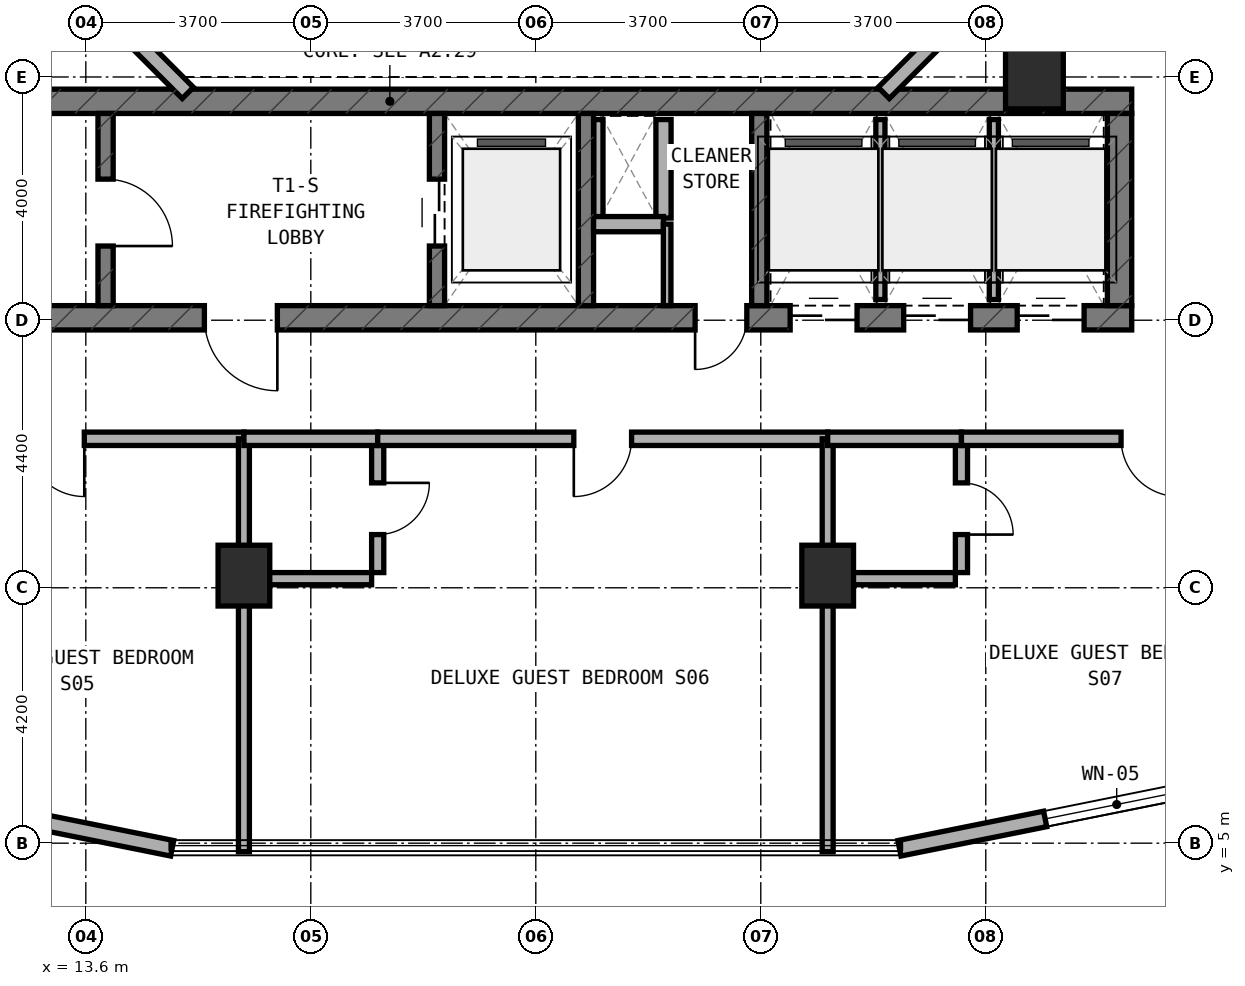
"""IFC4 building model, lengths in metres.
Left out: names, types, materials, properties, quantities, classifications, styles, units other than length and angle.
Written with IfcOpenShell. Run it as: python <this file> out.ifc"""

import sys

from ifc_helpers import new_model, si_unit, direction, frame, frame_2d, origin, origin_2d, place, context, subcontext, project, spatial, rectangle, extrude, element, fill, save


model = new_model("IFC4")
c1 = context("Model", 3, precision=1e-05, world=origin(), true_north=direction((0.0, 1.0)))
c2 = subcontext(c1, "Body", "Model", "MODEL_VIEW")
j1 = project(units=[si_unit("LENGTHUNIT", "METRE"), si_unit("PLANEANGLEUNIT", "RADIAN")], contexts=[c1])
p1 = place(None, origin())
s1 = spatial("IfcSite", under=j1, at=p1, CompositionType="ELEMENT")
p2 = place(p1, origin())
s2 = spatial("IfcBuilding", under=s1, at=p2, CompositionType="ELEMENT")
p3 = place(p2, frame((0.0, 0.0, 127.5)))
s3 = spatial("IfcBuildingStorey", under=s2, at=p3, CompositionType="ELEMENT", Elevation=127.5)
p4 = place(p3, frame((6.4, 13.64, 0.0), z_axis=(0.0, 0.0, 1.0), x_axis=(1.0, 0.0, 0.0)))
e1 = element("IfcWall", 1, at=p4, inside=s3, PredefinedType="SHEAR", context=c2, shape_type="SweptSolid", body=[
    extrude(rectangle(XDim=24.4, YDim=0.4, at=frame_2d((12.2, 0.0))), origin(), (0.0, 0.0, 1.0), 3.5),
])
p5 = place(p4, frame((9.15, 0.0, 0.0)))
e2 = element("IfcOpeningElement", 2, at=p5, cuts=e1, PredefinedType="OPENING", context=c2, shape_type="SweptSolid", body=[
    extrude(rectangle(XDim=1.2, YDim=2.15, at=frame_2d((0.6, 1.075))), frame((0.0, 0.21, 0.0), z_axis=(0.0, -1.0, 0.0), x_axis=(1.0, 0.0, 0.0)), (0.0, 0.0, 1.0), 0.42),
])
p6 = place(p4, frame((17.22, 0.0, 0.0)))
e3 = element("IfcOpeningElement", 3, at=p6, cuts=e1, PredefinedType="OPENING", context=c2, shape_type="SweptSolid", body=[
    extrude(rectangle(XDim=0.85, YDim=2.1, at=frame_2d((0.425, 1.05))), frame((0.0, 0.21, 0.0), z_axis=(0.0, -1.0, 0.0), x_axis=(1.0, 0.0, 0.0)), (0.0, 0.0, 1.0), 0.42),
])
p7 = place(p4, frame((18.783, 0.0, 0.0)))
e4 = element("IfcOpeningElement", 4, at=p7, cuts=e1, PredefinedType="OPENING", context=c2, shape_type="SweptSolid", body=[
    extrude(rectangle(XDim=1.1, YDim=2.15, at=frame_2d((0.55, 1.075))), frame((0.0, 0.21, 0.0), z_axis=(0.0, -1.0, 0.0), x_axis=(1.0, 0.0, 0.0)), (0.0, 0.0, 1.0), 0.42),
])
p8 = place(p4, frame((20.65, 0.0, 0.0)))
e5 = element("IfcOpeningElement", 5, at=p8, cuts=e1, PredefinedType="OPENING", context=c2, shape_type="SweptSolid", body=[
    extrude(rectangle(XDim=1.1, YDim=2.15, at=frame_2d((0.55, 1.075))), frame((0.0, 0.21, 0.0), z_axis=(0.0, -1.0, 0.0), x_axis=(1.0, 0.0, 0.0)), (0.0, 0.0, 1.0), 0.42),
])
p9 = place(p4, frame((22.517, 0.0, 0.0)))
e6 = element("IfcOpeningElement", 6, at=p9, cuts=e1, PredefinedType="OPENING", context=c2, shape_type="SweptSolid", body=[
    extrude(rectangle(XDim=1.1, YDim=2.15, at=frame_2d((0.55, 1.075))), frame((0.0, 0.21, 0.0), z_axis=(0.0, -1.0, 0.0), x_axis=(1.0, 0.0, 0.0)), (0.0, 0.0, 1.0), 0.42),
])
p10 = place(p3, frame((6.4, 17.2, 0.0), z_axis=(0.0, 0.0, 1.0), x_axis=(1.0, 0.0, 0.0)))
e7 = element("IfcWall", 7, at=p10, inside=s3, PredefinedType="SHEAR", context=c2, shape_type="SweptSolid", body=[
    extrude(rectangle(XDim=24.4, YDim=0.4, at=frame_2d((12.2, 0.0))), origin(), (0.0, 0.0, 1.0), 3.5),
])
p11 = place(p3, frame((30.6, 13.84, 0.0), z_axis=(0.0, 0.0, 1.0), x_axis=(0.0, 1.0, 0.0)))
e8 = element("IfcWall", 8, at=p11, inside=s3, PredefinedType="SHEAR", context=c2, shape_type="SweptSolid", body=[
    extrude(rectangle(XDim=3.16, YDim=0.4, at=frame_2d((1.58, 0.0))), origin(), (0.0, 0.0, 1.0), 3.5),
])
p12 = place(p3, frame((13.925, 13.84, 0.0), z_axis=(0.0, 0.0, 1.0), x_axis=(0.0, 1.0, 0.0)))
e9 = element("IfcWall", 9, at=p12, inside=s3, PredefinedType="STANDARD", context=c2, shape_type="SweptSolid", body=[
    extrude(rectangle(XDim=3.16, YDim=0.25, at=frame_2d((1.58, 0.0))), origin(), (0.0, 0.0, 1.0), 3.22),
])
p13 = place(p12, frame((0.98, 0.0, 0.0)))
e10 = element("IfcOpeningElement", 10, at=p13, cuts=e9, PredefinedType="OPENING", context=c2, shape_type="SweptSolid", body=[
    extrude(rectangle(XDim=1.1, YDim=2.15, at=frame_2d((0.55, 1.075))), frame((0.0, 0.135, 0.0), z_axis=(0.0, -1.0, 0.0), x_axis=(1.0, 0.0, 0.0)), (0.0, 0.0, 1.0), 0.27),
])
p14 = place(p3, frame((19.375, 13.84, 0.0), z_axis=(0.0, 0.0, 1.0), x_axis=(0.0, 1.0, 0.0)))
e11 = element("IfcWall", 11, at=p14, inside=s3, PredefinedType="STANDARD", context=c2, shape_type="SweptSolid", body=[
    extrude(rectangle(XDim=3.16, YDim=0.25, at=frame_2d((1.58, 0.0))), origin(), (0.0, 0.0, 1.0), 3.22),
])
p15 = place(p14, frame((0.98, 0.0, 0.0)))
e12 = element("IfcOpeningElement", 12, at=p15, cuts=e11, PredefinedType="OPENING", context=c2, shape_type="SweptSolid", body=[
    extrude(rectangle(XDim=1.1, YDim=2.15, at=frame_2d((0.55, 1.075))), frame((0.0, 0.135, 0.0), z_axis=(0.0, -1.0, 0.0), x_axis=(1.0, 0.0, 0.0)), (0.0, 0.0, 1.0), 0.27),
])
for number, where, z_axis, x_axis in (
    (13, (21.825, 13.84, 0.0), (0.0, 0.0, 1.0), (0.0, 1.0, 0.0)),
    (14, (24.675, 13.84, 0.0), (0.0, 0.0, 1.0), (0.0, 1.0, 0.0)),
):
    element("IfcWall", number, at=place(p3, frame(where, z_axis=z_axis, x_axis=x_axis)), inside=s3, PredefinedType="STANDARD", context=c2, shape_type="SweptSolid", body=[
        extrude(rectangle(XDim=3.16, YDim=0.25, at=frame_2d((1.58, 0.0))), origin(), (0.0, 0.0, 1.0), 3.22),
    ])
for number, where, z_axis, x_axis in (
    (15, (16.2, 9.4, 0.0), (0.0, 0.0, 1.0), (1.0, 0.0, 0.0)),
    (16, (25.8, 9.4, 0.0), (0.0, 0.0, 1.0), (1.0, 0.0, 0.0)),
):
    element("IfcColumn", number, at=place(p3, frame(where, z_axis=z_axis, x_axis=x_axis)), inside=s3, PredefinedType="COLUMN", context=c2, shape_type="SweptSolid", body=[
        extrude(rectangle(XDim=0.85, YDim=1.0, at=origin_2d()), origin(), (0.0, 0.0, 1.0), 3.5),
    ])
p16 = place(p3, frame((29.2, 17.65, 0.0), z_axis=(0.0, 0.0, 1.0), x_axis=(1.0, 0.0, 0.0)))
e17 = element("IfcColumn", 17, at=p16, inside=s3, PredefinedType="COLUMN", context=c2, shape_type="SweptSolid", body=[
    extrude(rectangle(XDim=0.95, YDim=1.15, at=origin_2d()), origin(), (0.0, 0.0, 1.0), 3.5),
])
p17 = place(p3, frame((6.018, 6.729, 0.0), z_axis=(0.0, 0.0, 1.0), x_axis=(0.980315963543, -0.197435082048, 0.0)))
e18 = element("IfcWall", 18, at=p17, inside=s3, PredefinedType="STANDARD", context=c2, shape_type="SweptSolid", body=[
    extrude(rectangle(XDim=9.183, YDim=0.26, at=frame_2d((4.591, 0.0))), origin(), (0.0, 0.0, 1.0), 3.22),
])
p18 = place(p17, frame((4.337, 0.0, 0.8)))
e19 = element("IfcOpeningElement", 19, at=p18, cuts=e18, PredefinedType="OPENING", context=c2, shape_type="SweptSolid", body=[
    extrude(rectangle(XDim=2.4, YDim=1.6, at=frame_2d((1.2, 0.8))), frame((0.0, 0.14, 0.0), z_axis=(0.0, -1.0, 0.0), x_axis=(1.0, 0.0, 0.0)), (0.0, 0.0, 1.0), 0.28),
])
p19 = place(p3, frame((26.98, 4.916, 0.0), z_axis=(0.0, 0.0, 1.0), x_axis=(0.980315963543, 0.197435082048, 0.0)))
e20 = element("IfcWall", 20, at=p19, inside=s3, PredefinedType="STANDARD", context=c2, shape_type="SweptSolid", body=[
    extrude(rectangle(XDim=9.183, YDim=0.26, at=frame_2d((4.591, 0.0))), origin(), (0.0, 0.0, 1.0), 3.22),
])
p20 = place(p19, frame((2.445, 0.0, 0.8)))
e21 = element("IfcOpeningElement", 21, at=p20, cuts=e20, PredefinedType="OPENING", context=c2, shape_type="SweptSolid", body=[
    extrude(rectangle(XDim=2.4, YDim=1.6, at=frame_2d((1.2, 0.8))), frame((0.0, 0.14, 0.0), z_axis=(0.0, -1.0, 0.0), x_axis=(1.0, 0.0, 0.0)), (0.0, 0.0, 1.0), 0.28),
])
for number, where, z_axis, x_axis in (
    (22, (26.722, 17.338, 0.0), (0.0, 0.0, 1.0), (0.707, 0.707, 0.0)),
    (23, (13.444, 19.172, 0.0), (0.0, 0.0, 1.0), (0.707, -0.707, 0.0)),
):
    element("IfcWall", number, at=place(p3, frame(where, z_axis=z_axis, x_axis=x_axis)), inside=s3, PredefinedType="STANDARD", context=c2, shape_type="SweptSolid", body=[
        extrude(rectangle(XDim=2.594, YDim=0.26, at=frame_2d((1.297, 0.0))), origin(), (0.0, 0.0, 1.0), 3.22),
    ])
p21 = place(p3, frame((22.03, 15.28, 0.0), z_axis=(0.0, 0.0, 1.0), x_axis=(0.0, 1.0, 0.0)))
e24 = element("IfcWall", 24, at=p21, inside=s3, PredefinedType="PARTITIONING", context=c2, shape_type="SweptSolid", body=[
    extrude(rectangle(XDim=1.62, YDim=0.15, at=frame_2d((0.81, 0.0))), origin(), (0.0, 0.0, 1.0), 3.22),
])
p22 = place(p3, frame((23.1, 15.28, 0.0), z_axis=(0.0, 0.0, 1.0), x_axis=(0.0, 1.0, 0.0)))
e25 = element("IfcWall", 25, at=p22, inside=s3, PredefinedType="SOLIDWALL", context=c2, shape_type="SweptSolid", body=[
    extrude(rectangle(XDim=1.62, YDim=0.25, at=frame_2d((0.81, 0.0))), origin(), (0.0, 0.0, 1.0), 3.22),
])
p23 = place(p3, frame((21.95, 15.18, 0.0), z_axis=(0.0, 0.0, 1.0), x_axis=(1.0, 0.0, 0.0)))
e26 = element("IfcWall", 26, at=p23, inside=s3, PredefinedType="SOLIDWALL", context=c2, shape_type="SweptSolid", body=[
    extrude(rectangle(XDim=1.15, YDim=0.25, at=frame_2d((0.575, 0.0))), origin(), (0.0, 0.0, 1.0), 3.22),
])
p24 = place(p3, frame((23.16, 13.84, 0.0), z_axis=(0.0, 0.0, 1.0), x_axis=(0.0, 1.0, 0.0)))
e27 = element("IfcWall", 27, at=p24, inside=s3, PredefinedType="PARTITIONING", context=c2, shape_type="SweptSolid", body=[
    extrude(rectangle(XDim=1.34, YDim=0.125, at=frame_2d((0.67, 0.0))), origin(), (0.0, 0.0, 1.0), 3.22),
])
p25 = place(p3, frame((26.667, 13.94, 0.0), z_axis=(0.0, 0.0, 1.0), x_axis=(0.0, 1.0, 0.0)))
e28 = element("IfcWall", 28, at=p25, inside=s3, PredefinedType="PARTITIONING", context=c2, shape_type="SweptSolid", body=[
    extrude(rectangle(XDim=2.96, YDim=0.15, at=frame_2d((1.48, 0.0))), origin(), (0.0, 0.0, 1.0), 3.22),
])
p26 = place(p3, frame((28.533, 13.94, 0.0), z_axis=(0.0, 0.0, 1.0), x_axis=(0.0, 1.0, 0.0)))
e29 = element("IfcWall", 29, at=p26, inside=s3, PredefinedType="PARTITIONING", context=c2, shape_type="SweptSolid", body=[
    extrude(rectangle(XDim=2.96, YDim=0.15, at=frame_2d((1.48, 0.0))), origin(), (0.0, 0.0, 1.0), 2.695),
])
p27 = place(p3, frame((10.0, 11.65, 0.0), z_axis=(0.0, 0.0, 1.0), x_axis=(1.0, 0.0, 0.0)))
e30 = element("IfcWall", 30, at=p27, inside=s3, PredefinedType="SOLIDWALL", context=c2, shape_type="SweptSolid", body=[
    extrude(rectangle(XDim=6.2, YDim=0.22, at=frame_2d((3.1, 0.0))), origin(), (0.0, 0.0, 1.0), 2.695),
])
p28 = place(p27, frame((2.625, 0.0, 0.0)))
e31 = element("IfcOpeningElement", 31, at=p28, cuts=e30, PredefinedType="OPENING", context=c2, shape_type="SweptSolid", body=[
    extrude(rectangle(XDim=0.95, YDim=2.1, at=frame_2d((0.475, 1.05))), frame((0.0, 0.12, 0.0), z_axis=(0.0, -1.0, 0.0), x_axis=(1.0, 0.0, 0.0)), (0.0, 0.0, 1.0), 0.24),
])
p29 = place(p3, frame((16.2, 4.86, 0.0), z_axis=(0.0, 0.0, 1.0), x_axis=(0.0, 1.0, 0.0)))
e32 = element("IfcWall", 32, at=p29, inside=s3, PredefinedType="SOLIDWALL", context=c2, shape_type="SweptSolid", body=[
    extrude(rectangle(XDim=6.79, YDim=0.18, at=frame_2d((3.395, 0.0))), origin(), (0.0, 0.0, 1.0), 2.695),
])
p30 = place(p3, frame((18.4, 9.45, 0.0), z_axis=(0.0, 0.0, 1.0), x_axis=(0.0, 1.0, 0.0)))
e33 = element("IfcWall", 33, at=p30, inside=s3, PredefinedType="PLUMBINGWALL", context=c2, shape_type="SweptSolid", body=[
    extrude(rectangle(XDim=2.1, YDim=0.2, at=frame_2d((1.05, 0.0))), origin(), (0.0, 0.0, 1.0), 2.745),
])
p31 = place(p30, frame((0.625, 0.0, 0.0)))
e34 = element("IfcOpeningElement", 34, at=p31, cuts=e33, PredefinedType="OPENING", context=c2, shape_type="SweptSolid", body=[
    extrude(rectangle(XDim=0.85, YDim=2.1, at=frame_2d((0.425, 1.05))), frame((0.0, 0.11, 0.0), z_axis=(0.0, -1.0, 0.0), x_axis=(1.0, 0.0, 0.0)), (0.0, 0.0, 1.0), 0.22),
])
p32 = place(p3, frame((16.3, 9.35, 0.0), z_axis=(0.0, 0.0, 1.0), x_axis=(1.0, 0.0, 0.0)))
e35 = element("IfcWall", 35, at=p32, inside=s3, PredefinedType="PLUMBINGWALL", context=c2, shape_type="SweptSolid", body=[
    extrude(rectangle(XDim=2.0, YDim=0.2, at=frame_2d((1.0, 0.0))), origin(), (0.0, 0.0, 1.0), 2.835),
])
p33 = place(p3, frame((16.2, 11.65, 0.0), z_axis=(0.0, 0.0, 1.0), x_axis=(1.0, 0.0, 0.0)))
e36 = element("IfcWall", 36, at=p33, inside=s3, PredefinedType="SOLIDWALL", context=c2, shape_type="SweptSolid", body=[
    extrude(rectangle(XDim=2.2, YDim=0.22, at=frame_2d((1.1, 0.0))), origin(), (0.0, 0.0, 1.0), 2.695),
])
p34 = place(p3, frame((18.4, 11.65, 0.0), z_axis=(0.0, 0.0, 1.0), x_axis=(1.0, 0.0, 0.0)))
e37 = element("IfcWall", 37, at=p34, inside=s3, PredefinedType="SOLIDWALL", context=c2, shape_type="SweptSolid", body=[
    extrude(rectangle(XDim=7.4, YDim=0.22, at=frame_2d((3.7, 0.0))), origin(), (0.0, 0.0, 1.0), 2.695),
])
p35 = place(p34, frame((3.225, 0.0, 0.0)))
e38 = element("IfcOpeningElement", 38, at=p35, cuts=e37, PredefinedType="OPENING", context=c2, shape_type="SweptSolid", body=[
    extrude(rectangle(XDim=0.95, YDim=2.1, at=frame_2d((0.475, 1.05))), frame((0.0, 0.12, 0.0), z_axis=(0.0, -1.0, 0.0), x_axis=(1.0, 0.0, 0.0)), (0.0, 0.0, 1.0), 0.24),
])
p36 = place(p3, frame((25.8, 4.86, 0.0), z_axis=(0.0, 0.0, 1.0), x_axis=(0.0, 1.0, 0.0)))
e39 = element("IfcWall", 39, at=p36, inside=s3, PredefinedType="SOLIDWALL", context=c2, shape_type="SweptSolid", body=[
    extrude(rectangle(XDim=6.79, YDim=0.18, at=frame_2d((3.395, 0.0))), origin(), (0.0, 0.0, 1.0), 2.695),
])
p37 = place(p3, frame((28.0, 9.45, 0.0), z_axis=(0.0, 0.0, 1.0), x_axis=(0.0, 1.0, 0.0)))
e40 = element("IfcWall", 40, at=p37, inside=s3, PredefinedType="PLUMBINGWALL", context=c2, shape_type="SweptSolid", body=[
    extrude(rectangle(XDim=2.1, YDim=0.2, at=frame_2d((1.05, 0.0))), origin(), (0.0, 0.0, 1.0), 2.745),
])
p38 = place(p37, frame((0.625, 0.0, 0.0)))
e41 = element("IfcOpeningElement", 41, at=p38, cuts=e40, PredefinedType="OPENING", context=c2, shape_type="SweptSolid", body=[
    extrude(rectangle(XDim=0.85, YDim=2.1, at=frame_2d((0.425, 1.05))), frame((0.0, 0.11, 0.0), z_axis=(0.0, -1.0, 0.0), x_axis=(1.0, 0.0, 0.0)), (0.0, 0.0, 1.0), 0.22),
])
p39 = place(p3, frame((25.9, 9.35, 0.0), z_axis=(0.0, 0.0, 1.0), x_axis=(1.0, 0.0, 0.0)))
e42 = element("IfcWall", 42, at=p39, inside=s3, PredefinedType="PLUMBINGWALL", context=c2, shape_type="SweptSolid", body=[
    extrude(rectangle(XDim=2.0, YDim=0.2, at=frame_2d((1.0, 0.0))), origin(), (0.0, 0.0, 1.0), 2.835),
])
p40 = place(p3, frame((25.8, 11.65, 0.0), z_axis=(0.0, 0.0, 1.0), x_axis=(1.0, 0.0, 0.0)))
e43 = element("IfcWall", 43, at=p40, inside=s3, PredefinedType="SOLIDWALL", context=c2, shape_type="SweptSolid", body=[
    extrude(rectangle(XDim=2.2, YDim=0.22, at=frame_2d((1.1, 0.0))), origin(), (0.0, 0.0, 1.0), 2.695),
])
p41 = place(p3, frame((28.0, 11.65, 0.0), z_axis=(0.0, 0.0, 1.0), x_axis=(1.0, 0.0, 0.0)))
e44 = element("IfcWall", 44, at=p41, inside=s3, PredefinedType="SOLIDWALL", context=c2, shape_type="SweptSolid", body=[
    extrude(rectangle(XDim=6.2, YDim=0.22, at=frame_2d((3.1, 0.0))), origin(), (0.0, 0.0, 1.0), 2.695),
])
p42 = place(p41, frame((2.625, 0.0, 0.0)))
e45 = element("IfcOpeningElement", 45, at=p42, cuts=e44, PredefinedType="OPENING", context=c2, shape_type="SweptSolid", body=[
    extrude(rectangle(XDim=0.95, YDim=2.1, at=frame_2d((0.475, 1.05))), frame((0.0, 0.12, 0.0), z_axis=(0.0, -1.0, 0.0), x_axis=(1.0, 0.0, 0.0)), (0.0, 0.0, 1.0), 0.24),
])
p43 = place(p20, origin())
e46 = element("IfcWindow", 46, at=p43, inside=s3, PartitioningType="SINGLE_PANEL", PredefinedType="WINDOW", context=c2, shape_type="SweptSolid", body=[
    extrude(rectangle(XDim=2.4, YDim=1.6, at=frame_2d((1.2, 0.8))), frame((0.0, 0.03, 0.0), z_axis=(0.0, -1.0, 0.0), x_axis=(1.0, 0.0, 0.0)), (0.0, 0.0, 1.0), 0.06),
])
fill(e21, e46)
p44 = place(p13, frame((1.1, 0.0, 0.0), z_axis=(0.0, 0.0, 1.0), x_axis=(-1.0, 0.0, 0.0)))
e47 = element("IfcDoor", 47, at=p44, inside=s3, OperationType="SINGLE_SWING_RIGHT", PredefinedType="DOOR", context=c2, shape_type="SweptSolid", body=[
    extrude(rectangle(XDim=1.1, YDim=2.15, at=frame_2d((0.55, 1.075))), frame((0.0, 0.025, 0.0), z_axis=(0.0, -1.0, 0.0), x_axis=(1.0, 0.0, 0.0)), (0.0, 0.0, 1.0), 0.05),
])
fill(e10, e47)
p45 = place(p5, frame((1.2, 0.0, 0.0), z_axis=(0.0, 0.0, 1.0), x_axis=(-1.0, 0.0, 0.0)))
e48 = element("IfcDoor", 48, at=p45, inside=s3, OperationType="SINGLE_SWING_LEFT", PredefinedType="DOOR", context=c2, shape_type="SweptSolid", body=[
    extrude(rectangle(XDim=1.2, YDim=2.15, at=frame_2d((0.6, 1.075))), frame((0.0, 0.025, 0.0), z_axis=(0.0, -1.0, 0.0), x_axis=(1.0, 0.0, 0.0)), (0.0, 0.0, 1.0), 0.05),
])
fill(e2, e48)
p46 = place(p15, origin())
e49 = element("IfcDoor", 49, at=p46, inside=s3, OperationType="DOUBLE_DOOR_SLIDING", PredefinedType="DOOR", context=c2, shape_type="SweptSolid", body=[
    extrude(rectangle(XDim=1.1, YDim=2.15, at=frame_2d((0.55, 1.075))), frame((0.0, 0.025, 0.0), z_axis=(0.0, -1.0, 0.0), x_axis=(1.0, 0.0, 0.0)), (0.0, 0.0, 1.0), 0.05),
])
fill(e12, e49)
p47 = place(p6, frame((0.85, 0.0, 0.0), z_axis=(0.0, 0.0, 1.0), x_axis=(-1.0, 0.0, 0.0)))
e50 = element("IfcDoor", 50, at=p47, inside=s3, OperationType="SINGLE_SWING_RIGHT", PredefinedType="DOOR", context=c2, shape_type="SweptSolid", body=[
    extrude(rectangle(XDim=0.85, YDim=2.1, at=frame_2d((0.425, 1.05))), frame((0.0, 0.025, 0.0), z_axis=(0.0, -1.0, 0.0), x_axis=(1.0, 0.0, 0.0)), (0.0, 0.0, 1.0), 0.05),
])
fill(e3, e50)
p48 = place(p7, frame((1.1, 0.0, 0.0), z_axis=(0.0, 0.0, 1.0), x_axis=(-1.0, 0.0, 0.0)))
e51 = element("IfcDoor", 51, at=p48, inside=s3, OperationType="DOUBLE_DOOR_SLIDING", PredefinedType="DOOR", context=c2, shape_type="SweptSolid", body=[
    extrude(rectangle(XDim=1.1, YDim=2.15, at=frame_2d((0.55, 1.075))), frame((0.0, 0.025, 0.0), z_axis=(0.0, -1.0, 0.0), x_axis=(1.0, 0.0, 0.0)), (0.0, 0.0, 1.0), 0.05),
])
fill(e4, e51)
p49 = place(p8, frame((1.1, 0.0, 0.0), z_axis=(0.0, 0.0, 1.0), x_axis=(-1.0, 0.0, 0.0)))
e52 = element("IfcDoor", 52, at=p49, inside=s3, OperationType="DOUBLE_DOOR_SLIDING", PredefinedType="DOOR", context=c2, shape_type="SweptSolid", body=[
    extrude(rectangle(XDim=1.1, YDim=2.15, at=frame_2d((0.55, 1.075))), frame((0.0, 0.025, 0.0), z_axis=(0.0, -1.0, 0.0), x_axis=(1.0, 0.0, 0.0)), (0.0, 0.0, 1.0), 0.05),
])
fill(e5, e52)
p50 = place(p9, frame((1.1, 0.0, 0.0), z_axis=(0.0, 0.0, 1.0), x_axis=(-1.0, 0.0, 0.0)))
e53 = element("IfcDoor", 53, at=p50, inside=s3, OperationType="DOUBLE_DOOR_SLIDING", PredefinedType="DOOR", context=c2, shape_type="SweptSolid", body=[
    extrude(rectangle(XDim=1.1, YDim=2.15, at=frame_2d((0.55, 1.075))), frame((0.0, 0.025, 0.0), z_axis=(0.0, -1.0, 0.0), x_axis=(1.0, 0.0, 0.0)), (0.0, 0.0, 1.0), 0.05),
])
fill(e6, e53)
p51 = place(p28, frame((0.95, 0.0, 0.0), z_axis=(0.0, 0.0, 1.0), x_axis=(-1.0, 0.0, 0.0)))
e54 = element("IfcDoor", 54, at=p51, inside=s3, OperationType="SINGLE_SWING_LEFT", PredefinedType="DOOR", context=c2, shape_type="SweptSolid", body=[
    extrude(rectangle(XDim=0.95, YDim=2.1, at=frame_2d((0.475, 1.05))), frame((0.0, 0.025, 0.0), z_axis=(0.0, -1.0, 0.0), x_axis=(1.0, 0.0, 0.0)), (0.0, 0.0, 1.0), 0.05),
])
fill(e31, e54)
p52 = place(p31, frame((0.85, 0.0, 0.0), z_axis=(0.0, 0.0, 1.0), x_axis=(-1.0, 0.0, 0.0)))
e55 = element("IfcDoor", 55, at=p52, inside=s3, OperationType="SINGLE_SWING_LEFT", PredefinedType="DOOR", context=c2, shape_type="SweptSolid", body=[
    extrude(rectangle(XDim=0.85, YDim=2.1, at=frame_2d((0.425, 1.05))), frame((0.0, 0.025, 0.0), z_axis=(0.0, -1.0, 0.0), x_axis=(1.0, 0.0, 0.0)), (0.0, 0.0, 1.0), 0.05),
])
fill(e34, e55)
p53 = place(p35, frame((0.95, 0.0, 0.0), z_axis=(0.0, 0.0, 1.0), x_axis=(-1.0, 0.0, 0.0)))
e56 = element("IfcDoor", 56, at=p53, inside=s3, OperationType="SINGLE_SWING_RIGHT", PredefinedType="DOOR", context=c2, shape_type="SweptSolid", body=[
    extrude(rectangle(XDim=0.95, YDim=2.1, at=frame_2d((0.475, 1.05))), frame((0.0, 0.025, 0.0), z_axis=(0.0, -1.0, 0.0), x_axis=(1.0, 0.0, 0.0)), (0.0, 0.0, 1.0), 0.05),
])
fill(e38, e56)
p54 = place(p38, frame((0.85, 0.0, 0.0), z_axis=(0.0, 0.0, 1.0), x_axis=(-1.0, 0.0, 0.0)))
e57 = element("IfcDoor", 57, at=p54, inside=s3, OperationType="SINGLE_SWING_RIGHT", PredefinedType="DOOR", context=c2, shape_type="SweptSolid", body=[
    extrude(rectangle(XDim=0.85, YDim=2.1, at=frame_2d((0.425, 1.05))), frame((0.0, 0.025, 0.0), z_axis=(0.0, -1.0, 0.0), x_axis=(1.0, 0.0, 0.0)), (0.0, 0.0, 1.0), 0.05),
])
fill(e41, e57)
p55 = place(p42, frame((0.95, 0.0, 0.0), z_axis=(0.0, 0.0, 1.0), x_axis=(-1.0, 0.0, 0.0)))
e58 = element("IfcDoor", 58, at=p55, inside=s3, OperationType="SINGLE_SWING_LEFT", PredefinedType="DOOR", context=c2, shape_type="SweptSolid", body=[
    extrude(rectangle(XDim=0.95, YDim=2.1, at=frame_2d((0.475, 1.05))), frame((0.0, 0.025, 0.0), z_axis=(0.0, -1.0, 0.0), x_axis=(1.0, 0.0, 0.0)), (0.0, 0.0, 1.0), 0.05),
])
fill(e45, e58)
save(model, sys.argv[1])
